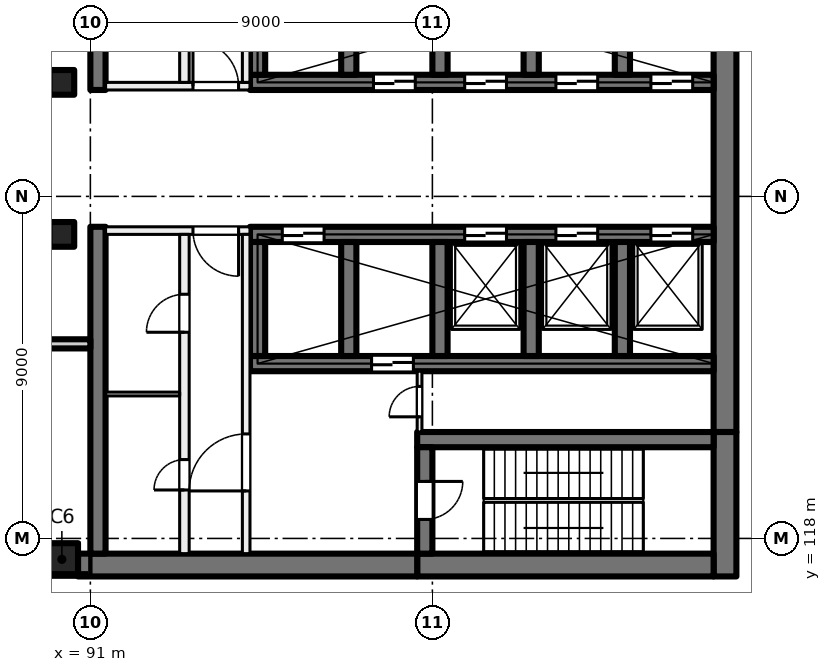
"""IFC4 building model, lengths in metres.
Left out: names, types, materials, properties, quantities, classifications, styles, units other than length and angle.
Written with IfcOpenShell. Run it as: python <this file> out.ifc"""

import sys

from ifc_helpers import new_model, si_unit, direction, frame, frame_2d, origin, origin_2d, place, context, subcontext, project, spatial, rectangle, extrude, element, fill, save


model = new_model("IFC4")
c1 = context("Model", 3, precision=1e-05, world=origin(), true_north=direction((0.0, 1.0)))
c2 = subcontext(c1, "Body", "Model", "MODEL_VIEW")
j1 = project(units=[si_unit("LENGTHUNIT", "METRE"), si_unit("PLANEANGLEUNIT", "RADIAN")], contexts=[c1])
p1 = place(None, origin())
s1 = spatial("IfcSite", under=j1, at=p1, CompositionType="ELEMENT")
p2 = place(p1, origin())
s2 = spatial("IfcBuilding", under=s1, at=p2, CompositionType="ELEMENT")
p3 = place(p2, frame((0.0, 0.0, 129.0)))
s3 = spatial("IfcBuildingStorey", under=s2, at=p3, CompositionType="ELEMENT", Elevation=129.0)
for number, where, z_axis, x_axis in (
    (1, (90.25, 130.0, 0.0), (0.0, 0.0, 1.0), (1.0, 0.0, 0.0)),
    (2, (90.25, 126.0, 0.0), (0.0, 0.0, 1.0), (1.0, 0.0, 0.0)),
):
    element("IfcColumn", number, at=place(p3, frame(where, z_axis=z_axis, x_axis=x_axis)), inside=s3, PredefinedType="COLUMN", context=c2, shape_type="SweptSolid", body=[
        extrude(rectangle(XDim=0.65, YDim=0.65, at=origin_2d()), origin(), (0.0, 0.0, 1.0), 5.5),
    ])
p4 = place(p3, frame((90.25, 117.45, 0.0), z_axis=(0.0, 0.0, 1.0), x_axis=(1.0, 0.0, 0.0)))
e3 = element("IfcColumn", 3, at=p4, inside=s3, PredefinedType="COLUMN", context=c2, shape_type="SweptSolid", body=[
    extrude(rectangle(XDim=0.85, YDim=0.85, at=origin_2d()), origin(), (0.0, 0.0, 1.0), 5.5),
])
p5 = place(p3, frame((107.7, 135.2, 0.0), z_axis=(0.0, 0.0, 1.0), x_axis=(0.0, -1.0, 0.0)))
e4 = element("IfcWall", 4, at=p5, inside=s3, PredefinedType="SHEAR", context=c2, shape_type="SweptSolid", body=[
    extrude(rectangle(XDim=14.4, YDim=0.6, at=frame_2d((7.2, 0.0))), origin(), (0.0, 0.0, 1.0), 5.5),
])
p6 = place(p3, frame((107.7, 120.8, 0.0), z_axis=(0.0, 0.0, 1.0), x_axis=(0.0, -1.0, 0.0)))
e5 = element("IfcWall", 5, at=p6, inside=s3, PredefinedType="SHEAR", context=c2, shape_type="SweptSolid", body=[
    extrude(rectangle(XDim=3.8, YDim=0.6, at=frame_2d((1.9, 0.0))), origin(), (0.0, 0.0, 1.0), 5.5),
])
p7 = place(p3, frame((107.4, 117.3, 0.0), z_axis=(0.0, 0.0, 1.0), x_axis=(-1.0, 0.0, 0.0)))
e6 = element("IfcWall", 6, at=p7, inside=s3, PredefinedType="SHEAR", context=c2, shape_type="SweptSolid", body=[
    extrude(rectangle(XDim=7.8, YDim=0.6, at=frame_2d((3.9, 0.0))), origin(), (0.0, 0.0, 1.0), 5.5),
])
p8 = place(p3, frame((99.6, 117.3, 0.0), z_axis=(0.0, 0.0, 1.0), x_axis=(-1.0, 0.0, 0.0)))
e7 = element("IfcWall", 7, at=p8, inside=s3, PredefinedType="SHEAR", context=c2, shape_type="SweptSolid", body=[
    extrude(rectangle(XDim=8.925, YDim=0.6, at=frame_2d((4.462, 0.0))), origin(), (0.0, 0.0, 1.0), 5.5),
])
p9 = place(p3, frame((107.4, 120.6, 0.0), z_axis=(0.0, 0.0, 1.0), x_axis=(-1.0, 0.0, 0.0)))
e8 = element("IfcWall", 8, at=p9, inside=s3, PredefinedType="SHEAR", context=c2, shape_type="SweptSolid", body=[
    extrude(rectangle(XDim=7.8, YDim=0.4, at=frame_2d((3.9, 0.0))), origin(), (0.0, 0.0, 1.0), 5.5),
])
p10 = place(p3, frame((99.8, 120.4, 0.0), z_axis=(0.0, 0.0, 1.0), x_axis=(0.0, -1.0, 0.0)))
e9 = element("IfcWall", 9, at=p10, inside=s3, PredefinedType="SHEAR", context=c2, shape_type="SweptSolid", body=[
    extrude(rectangle(XDim=2.8, YDim=0.4, at=frame_2d((1.4, 0.0))), origin(), (0.0, 0.0, 1.0), 5.5),
])
p11 = place(p10, frame((0.9, 0.0, 0.0)))
e10 = element("IfcOpeningElement", 10, at=p11, cuts=e9, PredefinedType="OPENING", context=c2, shape_type="SweptSolid", body=[
    extrude(rectangle(XDim=1.0, YDim=2.1, at=frame_2d((0.5, 1.05))), frame((0.0, 0.21, 0.0), z_axis=(0.0, -1.0, 0.0), x_axis=(1.0, 0.0, 0.0)), (0.0, 0.0, 1.0), 0.42),
])
p12 = place(p3, frame((107.4, 130.0, 0.0), z_axis=(0.0, 0.0, 1.0), x_axis=(-1.0, 0.0, 0.0)))
e11 = element("IfcWall", 11, at=p12, inside=s3, PredefinedType="SHEAR", context=c2, shape_type="SweptSolid", body=[
    extrude(rectangle(XDim=12.2, YDim=0.4, at=frame_2d((6.1, 0.0))), origin(), (0.0, 0.0, 1.0), 5.5),
])
p13 = place(p12, frame((0.55, 0.0, 0.0)))
e12 = element("IfcOpeningElement", 12, at=p13, cuts=e11, PredefinedType="OPENING", context=c2, shape_type="SweptSolid", body=[
    extrude(rectangle(XDim=1.1, YDim=2.1, at=frame_2d((0.55, 1.05))), frame((0.0, 0.21, 0.0), z_axis=(0.0, -1.0, 0.0), x_axis=(1.0, 0.0, 0.0)), (0.0, 0.0, 1.0), 0.42),
])
p14 = place(p12, frame((3.05, 0.0, 0.0)))
e13 = element("IfcOpeningElement", 13, at=p14, cuts=e11, PredefinedType="OPENING", context=c2, shape_type="SweptSolid", body=[
    extrude(rectangle(XDim=1.1, YDim=2.1, at=frame_2d((0.55, 1.05))), frame((0.0, 0.21, 0.0), z_axis=(0.0, -1.0, 0.0), x_axis=(1.0, 0.0, 0.0)), (0.0, 0.0, 1.0), 0.42),
])
p15 = place(p12, frame((5.45, 0.0, 0.0)))
e14 = element("IfcOpeningElement", 14, at=p15, cuts=e11, PredefinedType="OPENING", context=c2, shape_type="SweptSolid", body=[
    extrude(rectangle(XDim=1.1, YDim=2.1, at=frame_2d((0.55, 1.05))), frame((0.0, 0.21, 0.0), z_axis=(0.0, -1.0, 0.0), x_axis=(1.0, 0.0, 0.0)), (0.0, 0.0, 1.0), 0.42),
])
p16 = place(p12, frame((7.85, 0.0, 0.0)))
e15 = element("IfcOpeningElement", 15, at=p16, cuts=e11, PredefinedType="OPENING", context=c2, shape_type="SweptSolid", body=[
    extrude(rectangle(XDim=1.1, YDim=2.1, at=frame_2d((0.55, 1.05))), frame((0.0, 0.21, 0.0), z_axis=(0.0, -1.0, 0.0), x_axis=(1.0, 0.0, 0.0)), (0.0, 0.0, 1.0), 0.42),
])
for number, where, z_axis, x_axis in (
    (16, (105.0, 133.2, 0.0), (0.0, 0.0, 1.0), (0.0, -1.0, 0.0)),
    (17, (102.6, 133.2, 0.0), (0.0, 0.0, 1.0), (0.0, -1.0, 0.0)),
    (18, (100.2, 133.2, 0.0), (0.0, 0.0, 1.0), (0.0, -1.0, 0.0)),
    (19, (97.8, 133.2, 0.0), (0.0, 0.0, 1.0), (0.0, -1.0, 0.0)),
    (20, (95.4, 133.2, 0.0), (0.0, 0.0, 1.0), (0.0, -1.0, 0.0)),
):
    element("IfcWall", number, at=place(p3, frame(where, z_axis=z_axis, x_axis=x_axis)), inside=s3, PredefinedType="SHEAR", context=c2, shape_type="SweptSolid", body=[
        extrude(rectangle(XDim=3.0, YDim=0.4, at=frame_2d((1.5, 0.0))), origin(), (0.0, 0.0, 1.0), 5.5),
    ])
p17 = place(p3, frame((107.4, 126.0, 0.0), z_axis=(0.0, 0.0, 1.0), x_axis=(-1.0, 0.0, 0.0)))
e21 = element("IfcWall", 21, at=p17, inside=s3, PredefinedType="SHEAR", context=c2, shape_type="SweptSolid", body=[
    extrude(rectangle(XDim=12.2, YDim=0.4, at=frame_2d((6.1, 0.0))), origin(), (0.0, 0.0, 1.0), 5.5),
])
p18 = place(p17, frame((0.55, 0.0, 0.0)))
e22 = element("IfcOpeningElement", 22, at=p18, cuts=e21, PredefinedType="OPENING", context=c2, shape_type="SweptSolid", body=[
    extrude(rectangle(XDim=1.1, YDim=2.1, at=frame_2d((0.55, 1.05))), frame((0.0, 0.21, 0.0), z_axis=(0.0, -1.0, 0.0), x_axis=(1.0, 0.0, 0.0)), (0.0, 0.0, 1.0), 0.42),
])
p19 = place(p17, frame((3.05, 0.0, 0.0)))
e23 = element("IfcOpeningElement", 23, at=p19, cuts=e21, PredefinedType="OPENING", context=c2, shape_type="SweptSolid", body=[
    extrude(rectangle(XDim=1.1, YDim=2.1, at=frame_2d((0.55, 1.05))), frame((0.0, 0.21, 0.0), z_axis=(0.0, -1.0, 0.0), x_axis=(1.0, 0.0, 0.0)), (0.0, 0.0, 1.0), 0.42),
])
p20 = place(p17, frame((5.45, 0.0, 0.0)))
e24 = element("IfcOpeningElement", 24, at=p20, cuts=e21, PredefinedType="OPENING", context=c2, shape_type="SweptSolid", body=[
    extrude(rectangle(XDim=1.1, YDim=2.1, at=frame_2d((0.55, 1.05))), frame((0.0, 0.21, 0.0), z_axis=(0.0, -1.0, 0.0), x_axis=(1.0, 0.0, 0.0)), (0.0, 0.0, 1.0), 0.42),
])
p21 = place(p17, frame((10.25, 0.0, 0.0)))
e25 = element("IfcOpeningElement", 25, at=p21, cuts=e21, PredefinedType="OPENING", context=c2, shape_type="SweptSolid", body=[
    extrude(rectangle(XDim=1.1, YDim=2.1, at=frame_2d((0.55, 1.05))), frame((0.0, 0.21, 0.0), z_axis=(0.0, -1.0, 0.0), x_axis=(1.0, 0.0, 0.0)), (0.0, 0.0, 1.0), 0.42),
])
p22 = place(p3, frame((107.4, 122.6, 0.0), z_axis=(0.0, 0.0, 1.0), x_axis=(-1.0, 0.0, 0.0)))
e26 = element("IfcWall", 26, at=p22, inside=s3, PredefinedType="SHEAR", context=c2, shape_type="SweptSolid", body=[
    extrude(rectangle(XDim=12.2, YDim=0.4, at=frame_2d((6.1, 0.0))), origin(), (0.0, 0.0, 1.0), 5.5),
])
p23 = place(p22, frame((7.9, 0.0, 0.0)))
e27 = element("IfcOpeningElement", 27, at=p23, cuts=e26, PredefinedType="OPENING", context=c2, shape_type="SweptSolid", body=[
    extrude(rectangle(XDim=1.1, YDim=2.1, at=frame_2d((0.55, 1.05))), frame((0.0, 0.21, 0.0), z_axis=(0.0, -1.0, 0.0), x_axis=(1.0, 0.0, 0.0)), (0.0, 0.0, 1.0), 0.42),
])
for number, where, z_axis, x_axis in (
    (28, (105.0, 125.8, 0.0), (0.0, 0.0, 1.0), (0.0, -1.0, 0.0)),
    (29, (102.6, 125.8, 0.0), (0.0, 0.0, 1.0), (0.0, -1.0, 0.0)),
    (30, (100.2, 125.8, 0.0), (0.0, 0.0, 1.0), (0.0, -1.0, 0.0)),
    (31, (97.8, 125.8, 0.0), (0.0, 0.0, 1.0), (0.0, -1.0, 0.0)),
    (32, (95.4, 125.8, 0.0), (0.0, 0.0, 1.0), (0.0, -1.0, 0.0)),
):
    element("IfcWall", number, at=place(p3, frame(where, z_axis=z_axis, x_axis=x_axis)), inside=s3, PredefinedType="SHEAR", context=c2, shape_type="SweptSolid", body=[
        extrude(rectangle(XDim=3.0, YDim=0.4, at=frame_2d((1.5, 0.0))), origin(), (0.0, 0.0, 1.0), 5.5),
    ])
for number, where, z_axis, x_axis in (
    (33, (91.2, 138.4, 0.0), (0.0, 0.0, 1.0), (0.0, -1.0, 0.0)),
    (34, (91.2, 126.2, 0.0), (0.0, 0.0, 1.0), (0.0, -1.0, 0.0)),
):
    element("IfcWall", number, at=place(p3, frame(where, z_axis=z_axis, x_axis=x_axis)), inside=s3, PredefinedType="SHEAR", context=c2, shape_type="SweptSolid", body=[
        extrude(rectangle(XDim=8.6, YDim=0.4, at=frame_2d((4.3, 0.0))), origin(), (0.0, 0.0, 1.0), 5.5),
    ])
p24 = place(p3, frame((91.0, 123.12, 0.0), z_axis=(0.0, 0.0, 1.0), x_axis=(-1.0, 0.0, 0.0)))
e35 = element("IfcWall", 35, at=p24, inside=s3, PredefinedType="SOLIDWALL", context=c2, shape_type="SweptSolid", body=[
    extrude(rectangle(XDim=4.221, YDim=0.24, at=frame_2d((2.11, 0.0))), origin(), (0.0, 0.0, 1.0), 5.125),
])
p25 = place(p24, frame((1.21, 0.0, 0.0)))
e36 = element("IfcOpeningElement", 36, at=p25, cuts=e35, PredefinedType="OPENING", context=c2, shape_type="SweptSolid", body=[
    extrude(rectangle(XDim=1.8, YDim=2.4, at=frame_2d((0.9, 1.2))), frame((0.0, 0.13, 0.0), z_axis=(0.0, -1.0, 0.0), x_axis=(1.0, 0.0, 0.0)), (0.0, 0.0, 1.0), 0.26),
])
p26 = place(p3, frame((95.2, 126.1, 0.0), z_axis=(0.0, 0.0, 1.0), x_axis=(-1.0, 0.0, 0.0)))
e37 = element("IfcWall", 37, at=p26, inside=s3, PredefinedType="PARTITIONING", context=c2, shape_type="SweptSolid", body=[
    extrude(rectangle(XDim=3.8, YDim=0.2, at=frame_2d((1.9, 0.0))), origin(), (0.0, 0.0, 1.0), 5.125),
])
p27 = place(p26, frame((0.3, 0.0, 0.0)))
e38 = element("IfcOpeningElement", 38, at=p27, cuts=e37, PredefinedType="OPENING", context=c2, shape_type="SweptSolid", body=[
    extrude(rectangle(XDim=1.2, YDim=2.1, at=frame_2d((0.6, 1.05))), frame((0.0, 0.11, 0.0), z_axis=(0.0, -1.0, 0.0), x_axis=(1.0, 0.0, 0.0)), (0.0, 0.0, 1.0), 0.22),
])
p28 = place(p3, frame((95.1, 117.6, 0.0), z_axis=(0.0, 0.0, 1.0), x_axis=(0.0, 1.0, 0.0)))
e39 = element("IfcWall", 39, at=p28, inside=s3, PredefinedType="PARTITIONING", context=c2, shape_type="SweptSolid", body=[
    extrude(rectangle(XDim=8.4, YDim=0.2, at=frame_2d((4.2, 0.0))), origin(), (0.0, 0.0, 1.0), 5.125),
])
p29 = place(p28, frame((1.65, 0.0, 0.0)))
e40 = element("IfcOpeningElement", 40, at=p29, cuts=e39, PredefinedType="OPENING", context=c2, shape_type="SweptSolid", body=[
    extrude(rectangle(XDim=1.5, YDim=2.1, at=frame_2d((0.75, 1.05))), frame((0.0, 0.11, 0.0), z_axis=(0.0, -1.0, 0.0), x_axis=(1.0, 0.0, 0.0)), (0.0, 0.0, 1.0), 0.22),
])
p30 = place(p3, frame((93.475, 117.6, 0.0), z_axis=(0.0, 0.0, 1.0), x_axis=(0.0, 1.0, 0.0)))
e41 = element("IfcWall", 41, at=p30, inside=s3, PredefinedType="PARTITIONING", context=c2, shape_type="SweptSolid", body=[
    extrude(rectangle(XDim=8.4, YDim=0.25, at=frame_2d((4.2, 0.0))), origin(), (0.0, 0.0, 1.0), 5.125),
])
p31 = place(p30, frame((5.825, 0.0, 0.0)))
e42 = element("IfcOpeningElement", 42, at=p31, cuts=e41, PredefinedType="OPENING", context=c2, shape_type="SweptSolid", body=[
    extrude(rectangle(XDim=1.0, YDim=2.1, at=frame_2d((0.5, 1.05))), frame((0.0, 0.135, 0.0), z_axis=(0.0, -1.0, 0.0), x_axis=(1.0, 0.0, 0.0)), (0.0, 0.0, 1.0), 0.27),
])
p32 = place(p30, frame((1.675, 0.0, 0.0)))
e43 = element("IfcOpeningElement", 43, at=p32, cuts=e41, PredefinedType="OPENING", context=c2, shape_type="SweptSolid", body=[
    extrude(rectangle(XDim=0.8, YDim=2.1, at=frame_2d((0.4, 1.05))), frame((0.0, 0.135, 0.0), z_axis=(0.0, -1.0, 0.0), x_axis=(1.0, 0.0, 0.0)), (0.0, 0.0, 1.0), 0.27),
])
p33 = place(p3, frame((99.663, 120.8, 0.0), z_axis=(0.0, 0.0, 1.0), x_axis=(0.0, 1.0, 0.0)))
e44 = element("IfcWall", 44, at=p33, inside=s3, PredefinedType="PARTITIONING", context=c2, shape_type="SweptSolid", body=[
    extrude(rectangle(XDim=1.6, YDim=0.125, at=frame_2d((0.8, 0.0))), origin(), (0.0, 0.0, 1.0), 5.125),
])
p34 = place(p33, frame((0.4, 0.0, 0.0)))
e45 = element("IfcOpeningElement", 45, at=p34, cuts=e44, PredefinedType="OPENING", context=c2, shape_type="SweptSolid", body=[
    extrude(rectangle(XDim=0.8, YDim=2.1, at=frame_2d((0.4, 1.05))), frame((0.0, 0.073, 0.0), z_axis=(0.0, -1.0, 0.0), x_axis=(1.0, 0.0, 0.0)), (0.0, 0.0, 1.0), 0.145),
])
p35 = place(p3, frame((93.35, 121.8, 0.0), z_axis=(0.0, 0.0, 1.0), x_axis=(-1.0, 0.0, 0.0)))
e46 = element("IfcWall", 46, at=p35, inside=s3, PredefinedType="PARTITIONING", context=c2, shape_type="SweptSolid", body=[
    extrude(rectangle(XDim=1.95, YDim=0.1, at=frame_2d((0.975, 0.0))), origin(), (0.0, 0.0, 1.0), 5.125),
])
p36 = place(p3, frame((91.4, 129.9, 0.0), z_axis=(0.0, 0.0, 1.0), x_axis=(1.0, 0.0, 0.0)))
e47 = element("IfcWall", 47, at=p36, inside=s3, PredefinedType="PARTITIONING", context=c2, shape_type="SweptSolid", body=[
    extrude(rectangle(XDim=3.8, YDim=0.2, at=frame_2d((1.9, 0.0))), origin(), (0.0, 0.0, 1.0), 5.125),
])
p37 = place(p36, frame((2.3, 0.0, 0.0)))
e48 = element("IfcOpeningElement", 48, at=p37, cuts=e47, PredefinedType="OPENING", context=c2, shape_type="SweptSolid", body=[
    extrude(rectangle(XDim=1.2, YDim=2.1, at=frame_2d((0.6, 1.05))), frame((0.0, 0.11, 0.0), z_axis=(0.0, -1.0, 0.0), x_axis=(1.0, 0.0, 0.0)), (0.0, 0.0, 1.0), 0.22),
])
p38 = place(p3, frame((95.1, 130.0, 0.0), z_axis=(0.0, 0.0, 1.0), x_axis=(0.0, 1.0, 0.0)))
e49 = element("IfcWall", 49, at=p38, inside=s3, PredefinedType="PARTITIONING", context=c2, shape_type="SweptSolid", body=[
    extrude(rectangle(XDim=8.4, YDim=0.2, at=frame_2d((4.2, 0.0))), origin(), (0.0, 0.0, 1.0), 5.125),
])
p39 = place(p38, frame((5.25, 0.0, 0.0)))
e50 = element("IfcOpeningElement", 50, at=p39, cuts=e49, PredefinedType="OPENING", context=c2, shape_type="SweptSolid", body=[
    extrude(rectangle(XDim=1.5, YDim=2.1, at=frame_2d((0.75, 1.05))), frame((0.0, 0.11, 0.0), z_axis=(0.0, -1.0, 0.0), x_axis=(1.0, 0.0, 0.0)), (0.0, 0.0, 1.0), 0.22),
])
p40 = place(p3, frame((93.475, 130.0, 0.0), z_axis=(0.0, 0.0, 1.0), x_axis=(0.0, 1.0, 0.0)))
e51 = element("IfcWall", 51, at=p40, inside=s3, PredefinedType="PARTITIONING", context=c2, shape_type="SweptSolid", body=[
    extrude(rectangle(XDim=8.4, YDim=0.25, at=frame_2d((4.2, 0.0))), origin(), (0.0, 0.0, 1.0), 5.125),
])
p41 = place(p40, frame((3.7, 0.0, 0.0)))
e52 = element("IfcOpeningElement", 52, at=p41, cuts=e51, PredefinedType="OPENING", context=c2, shape_type="SweptSolid", body=[
    extrude(rectangle(XDim=1.0, YDim=2.1, at=frame_2d((0.5, 1.05))), frame((0.0, 0.135, 0.0), z_axis=(0.0, -1.0, 0.0), x_axis=(1.0, 0.0, 0.0)), (0.0, 0.0, 1.0), 0.27),
])
p42 = place(p18, origin())
e53 = element("IfcDoor", 53, at=p42, inside=s3, OperationType="DOUBLE_DOOR_SLIDING", PredefinedType="DOOR", context=c2, shape_type="SweptSolid", body=[
    extrude(rectangle(XDim=1.1, YDim=2.1, at=frame_2d((0.55, 1.05))), frame((0.0, 0.025, 0.0), z_axis=(0.0, -1.0, 0.0), x_axis=(1.0, 0.0, 0.0)), (0.0, 0.0, 1.0), 0.05),
])
fill(e22, e53)
p43 = place(p19, origin())
e54 = element("IfcDoor", 54, at=p43, inside=s3, OperationType="DOUBLE_DOOR_SLIDING", PredefinedType="DOOR", context=c2, shape_type="SweptSolid", body=[
    extrude(rectangle(XDim=1.1, YDim=2.1, at=frame_2d((0.55, 1.05))), frame((0.0, 0.025, 0.0), z_axis=(0.0, -1.0, 0.0), x_axis=(1.0, 0.0, 0.0)), (0.0, 0.0, 1.0), 0.05),
])
fill(e23, e54)
p44 = place(p20, origin())
e55 = element("IfcDoor", 55, at=p44, inside=s3, OperationType="DOUBLE_DOOR_SLIDING", PredefinedType="DOOR", context=c2, shape_type="SweptSolid", body=[
    extrude(rectangle(XDim=1.1, YDim=2.1, at=frame_2d((0.55, 1.05))), frame((0.0, 0.025, 0.0), z_axis=(0.0, -1.0, 0.0), x_axis=(1.0, 0.0, 0.0)), (0.0, 0.0, 1.0), 0.05),
])
fill(e24, e55)
p45 = place(p21, origin())
e56 = element("IfcDoor", 56, at=p45, inside=s3, OperationType="DOUBLE_DOOR_SLIDING", PredefinedType="DOOR", context=c2, shape_type="SweptSolid", body=[
    extrude(rectangle(XDim=1.1, YDim=2.1, at=frame_2d((0.55, 1.05))), frame((0.0, 0.025, 0.0), z_axis=(0.0, -1.0, 0.0), x_axis=(1.0, 0.0, 0.0)), (0.0, 0.0, 1.0), 0.05),
])
fill(e25, e56)
p46 = place(p13, origin())
e57 = element("IfcDoor", 57, at=p46, inside=s3, OperationType="DOUBLE_DOOR_SLIDING", PredefinedType="DOOR", context=c2, shape_type="SweptSolid", body=[
    extrude(rectangle(XDim=1.1, YDim=2.1, at=frame_2d((0.55, 1.05))), frame((0.0, 0.025, 0.0), z_axis=(0.0, -1.0, 0.0), x_axis=(1.0, 0.0, 0.0)), (0.0, 0.0, 1.0), 0.05),
])
fill(e12, e57)
p47 = place(p14, origin())
e58 = element("IfcDoor", 58, at=p47, inside=s3, OperationType="DOUBLE_DOOR_SLIDING", PredefinedType="DOOR", context=c2, shape_type="SweptSolid", body=[
    extrude(rectangle(XDim=1.1, YDim=2.1, at=frame_2d((0.55, 1.05))), frame((0.0, 0.025, 0.0), z_axis=(0.0, -1.0, 0.0), x_axis=(1.0, 0.0, 0.0)), (0.0, 0.0, 1.0), 0.05),
])
fill(e13, e58)
p48 = place(p15, origin())
e59 = element("IfcDoor", 59, at=p48, inside=s3, OperationType="DOUBLE_DOOR_SLIDING", PredefinedType="DOOR", context=c2, shape_type="SweptSolid", body=[
    extrude(rectangle(XDim=1.1, YDim=2.1, at=frame_2d((0.55, 1.05))), frame((0.0, 0.025, 0.0), z_axis=(0.0, -1.0, 0.0), x_axis=(1.0, 0.0, 0.0)), (0.0, 0.0, 1.0), 0.05),
])
fill(e14, e59)
p49 = place(p16, origin())
e60 = element("IfcDoor", 60, at=p49, inside=s3, OperationType="DOUBLE_DOOR_SLIDING", PredefinedType="DOOR", context=c2, shape_type="SweptSolid", body=[
    extrude(rectangle(XDim=1.1, YDim=2.1, at=frame_2d((0.55, 1.05))), frame((0.0, 0.025, 0.0), z_axis=(0.0, -1.0, 0.0), x_axis=(1.0, 0.0, 0.0)), (0.0, 0.0, 1.0), 0.05),
])
fill(e15, e60)
p50 = place(p27, origin())
e61 = element("IfcDoor", 61, at=p50, inside=s3, OperationType="DOUBLE_DOOR_SINGLE_SWING", PredefinedType="DOOR", context=c2, shape_type="SweptSolid", body=[
    extrude(rectangle(XDim=1.2, YDim=2.1, at=frame_2d((0.6, 1.05))), frame((0.0, 0.025, 0.0), z_axis=(0.0, -1.0, 0.0), x_axis=(1.0, 0.0, 0.0)), (0.0, 0.0, 1.0), 0.05),
])
fill(e38, e61)
p51 = place(p29, origin())
e62 = element("IfcDoor", 62, at=p51, inside=s3, OperationType="DOUBLE_DOOR_SINGLE_SWING", PredefinedType="DOOR", context=c2, shape_type="SweptSolid", body=[
    extrude(rectangle(XDim=1.5, YDim=2.1, at=frame_2d((0.75, 1.05))), frame((0.0, 0.025, 0.0), z_axis=(0.0, -1.0, 0.0), x_axis=(1.0, 0.0, 0.0)), (0.0, 0.0, 1.0), 0.05),
])
fill(e40, e62)
p52 = place(p11, origin())
e63 = element("IfcDoor", 63, at=p52, inside=s3, OperationType="SINGLE_SWING_LEFT", PredefinedType="DOOR", context=c2, shape_type="SweptSolid", body=[
    extrude(rectangle(XDim=1.0, YDim=2.1, at=frame_2d((0.5, 1.05))), frame((0.0, 0.025, 0.0), z_axis=(0.0, -1.0, 0.0), x_axis=(1.0, 0.0, 0.0)), (0.0, 0.0, 1.0), 0.05),
])
fill(e10, e63)
p53 = place(p34, origin())
e64 = element("IfcDoor", 64, at=p53, inside=s3, OperationType="SINGLE_SWING_RIGHT", PredefinedType="DOOR", context=c2, shape_type="SweptSolid", body=[
    extrude(rectangle(XDim=0.8, YDim=2.1, at=frame_2d((0.4, 1.05))), frame((0.0, 0.025, 0.0), z_axis=(0.0, -1.0, 0.0), x_axis=(1.0, 0.0, 0.0)), (0.0, 0.0, 1.0), 0.05),
])
fill(e45, e64)
p54 = place(p31, origin())
e65 = element("IfcDoor", 65, at=p54, inside=s3, OperationType="SINGLE_SWING_LEFT", PredefinedType="DOOR", context=c2, shape_type="SweptSolid", body=[
    extrude(rectangle(XDim=1.0, YDim=2.1, at=frame_2d((0.5, 1.05))), frame((0.0, 0.025, 0.0), z_axis=(0.0, -1.0, 0.0), x_axis=(1.0, 0.0, 0.0)), (0.0, 0.0, 1.0), 0.05),
])
fill(e42, e65)
p55 = place(p32, origin())
e66 = element("IfcDoor", 66, at=p55, inside=s3, OperationType="SINGLE_SWING_RIGHT", PredefinedType="DOOR", context=c2, shape_type="SweptSolid", body=[
    extrude(rectangle(XDim=0.8, YDim=2.1, at=frame_2d((0.4, 1.05))), frame((0.0, 0.025, 0.0), z_axis=(0.0, -1.0, 0.0), x_axis=(1.0, 0.0, 0.0)), (0.0, 0.0, 1.0), 0.05),
])
fill(e43, e66)
p56 = place(p37, origin())
e67 = element("IfcDoor", 67, at=p56, inside=s3, OperationType="DOUBLE_DOOR_SINGLE_SWING", PredefinedType="DOOR", context=c2, shape_type="SweptSolid", body=[
    extrude(rectangle(XDim=1.2, YDim=2.1, at=frame_2d((0.6, 1.05))), frame((0.0, 0.025, 0.0), z_axis=(0.0, -1.0, 0.0), x_axis=(1.0, 0.0, 0.0)), (0.0, 0.0, 1.0), 0.05),
])
fill(e48, e67)
p57 = place(p23, origin())
e68 = element("IfcDoor", 68, at=p57, inside=s3, OperationType="DOUBLE_DOOR_SLIDING", PredefinedType="DOOR", context=c2, shape_type="SweptSolid", body=[
    extrude(rectangle(XDim=1.1, YDim=2.1, at=frame_2d((0.55, 1.05))), frame((0.0, 0.025, 0.0), z_axis=(0.0, -1.0, 0.0), x_axis=(1.0, 0.0, 0.0)), (0.0, 0.0, 1.0), 0.05),
])
fill(e27, e68)
save(model, sys.argv[1])
